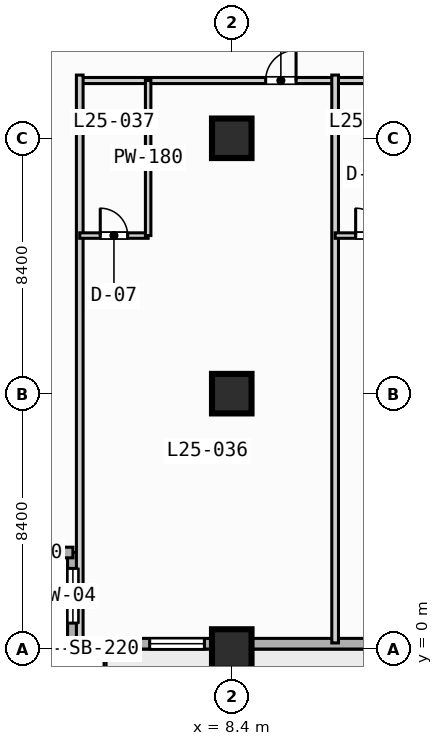
"""IFC4 building model, lengths in metres.
Left out: names, types, materials, properties, quantities, classifications, styles, units other than length and angle.
Written with IfcOpenShell. Run it as: python <this file> out.ifc"""

import sys

from ifc_helpers import new_model, si_unit, direction, frame, frame_2d, origin, origin_2d, place, context, subcontext, project, spatial, rectangle, extrude, element, fill, save


model = new_model("IFC4")
c1 = context("Model", 3, precision=1e-05, world=origin(), true_north=direction((0.0, 1.0)))
c2 = subcontext(c1, "Body", "Model", "MODEL_VIEW")
j1 = project(units=[si_unit("LENGTHUNIT", "METRE"), si_unit("PLANEANGLEUNIT", "RADIAN")], contexts=[c1])
p1 = place(None, origin())
s1 = spatial("IfcSite", under=j1, at=p1, CompositionType="ELEMENT")
p2 = place(p1, origin())
s2 = spatial("IfcBuilding", under=s1, at=p2, CompositionType="ELEMENT")
p3 = place(p2, frame((0.0, 0.0, 107.6)))
s3 = spatial("IfcBuildingStorey", under=s2, at=p3, CompositionType="ELEMENT", Elevation=107.6)
for number, where, z_axis, x_axis in (
    (1, (8.4, 0.0, 0.0), (0.0, 0.0, 1.0), (1.0, 0.0, 0.0)),
    (2, (8.4, 8.4, 0.0), (0.0, 0.0, 1.0), (1.0, 0.0, 0.0)),
    (3, (8.4, 16.8, 0.0), (0.0, 0.0, 1.0), (1.0, 0.0, 0.0)),
):
    element("IfcColumn", number, at=place(p3, frame(where, z_axis=z_axis, x_axis=x_axis)), inside=s3, PredefinedType="COLUMN", context=c2, shape_type="SweptSolid", body=[
        extrude(rectangle(XDim=1.3, YDim=1.3, at=origin_2d()), origin(), (0.0, 0.0, 1.0), 3.8),
    ])
p4 = place(p3, frame((3.175, 0.175, 0.0), z_axis=(0.0, 0.0, 1.0), x_axis=(0.0, 1.0, 0.0)))
e4 = element("IfcWall", 4, at=p4, inside=s3, PredefinedType="STANDARD", context=c2, shape_type="SweptSolid", body=[
    extrude(rectangle(XDim=3.0, YDim=0.35, at=frame_2d((1.5, 0.0))), origin(), (0.0, 0.0, 1.0), 3.55),
])
p5 = place(p4, frame((0.677, 0.0, 0.85)))
e5 = element("IfcOpeningElement", 5, at=p5, cuts=e4, PredefinedType="OPENING", context=c2, shape_type="SweptSolid", body=[
    extrude(rectangle(XDim=1.8, YDim=1.8, at=frame_2d((0.9, 0.9))), frame((0.0, 0.185, 0.0), z_axis=(0.0, -1.0, 0.0), x_axis=(1.0, 0.0, 0.0)), (0.0, 0.0, 1.0), 0.37),
])
p6 = place(p3, frame((3.175, 3.175, 0.0), z_axis=(0.0, 0.0, 1.0), x_axis=(-1.0, 0.0, 0.0)))
e6 = element("IfcWall", 6, at=p6, inside=s3, PredefinedType="STANDARD", context=c2, shape_type="SweptSolid", body=[
    extrude(rectangle(XDim=3.0, YDim=0.35, at=frame_2d((1.5, 0.0))), origin(), (0.0, 0.0, 1.0), 3.55),
])
p7 = place(p3, frame((72.425, 0.175, 0.0), z_axis=(0.0, 0.0, 1.0), x_axis=(-1.0, 0.0, 0.0)))
e7 = element("IfcWall", 7, at=p7, inside=s3, PredefinedType="STANDARD", context=c2, shape_type="SweptSolid", body=[
    extrude(rectangle(XDim=69.25, YDim=0.35, at=frame_2d((34.625, 0.0))), origin(), (0.0, 0.0, 1.0), 3.55),
])
p8 = place(p7, frame((50.225, 0.0, 0.0)))
e8 = element("IfcOpeningElement", 8, at=p8, cuts=e7, PredefinedType="OPENING", context=c2, shape_type="SweptSolid", body=[
    extrude(rectangle(XDim=1.4, YDim=2.2, at=frame_2d((0.7, 1.1))), frame((0.0, 0.185, 0.0), z_axis=(0.0, -1.0, 0.0), x_axis=(1.0, 0.0, 0.0)), (0.0, 0.0, 1.0), 0.37),
])
p9 = place(p7, frame((33.525, 0.0, 0.85)))
e9 = element("IfcOpeningElement", 9, at=p9, cuts=e7, PredefinedType="OPENING", context=c2, shape_type="SweptSolid", body=[
    extrude(rectangle(XDim=2.2, YDim=1.8, at=frame_2d((1.1, 0.9))), frame((0.0, 0.185, 0.0), z_axis=(0.0, -1.0, 0.0), x_axis=(1.0, 0.0, 0.0)), (0.0, 0.0, 1.0), 0.37),
])
p10 = place(p7, frame((25.125, 0.0, 0.85)))
e10 = element("IfcOpeningElement", 10, at=p10, cuts=e7, PredefinedType="OPENING", context=c2, shape_type="SweptSolid", body=[
    extrude(rectangle(XDim=2.2, YDim=1.8, at=frame_2d((1.1, 0.9))), frame((0.0, 0.185, 0.0), z_axis=(0.0, -1.0, 0.0), x_axis=(1.0, 0.0, 0.0)), (0.0, 0.0, 1.0), 0.37),
])
p11 = place(p7, frame((8.325, 0.0, 0.85)))
e11 = element("IfcOpeningElement", 11, at=p11, cuts=e7, PredefinedType="OPENING", context=c2, shape_type="SweptSolid", body=[
    extrude(rectangle(XDim=2.2, YDim=1.8, at=frame_2d((1.1, 0.9))), frame((0.0, 0.185, 0.0), z_axis=(0.0, -1.0, 0.0), x_axis=(1.0, 0.0, 0.0)), (0.0, 0.0, 1.0), 0.37),
])
p12 = place(p7, frame((64.925, 0.0, 0.85)))
e12 = element("IfcOpeningElement", 12, at=p12, cuts=e7, PredefinedType="OPENING", context=c2, shape_type="SweptSolid", body=[
    extrude(rectangle(XDim=1.8, YDim=1.8, at=frame_2d((0.9, 0.9))), frame((0.0, 0.185, 0.0), z_axis=(0.0, -1.0, 0.0), x_axis=(1.0, 0.0, 0.0)), (0.0, 0.0, 1.0), 0.37),
])
p13 = place(p7, frame((56.525, 0.0, 0.85)))
e13 = element("IfcOpeningElement", 13, at=p13, cuts=e7, PredefinedType="OPENING", context=c2, shape_type="SweptSolid", body=[
    extrude(rectangle(XDim=1.8, YDim=1.8, at=frame_2d((0.9, 0.9))), frame((0.0, 0.185, 0.0), z_axis=(0.0, -1.0, 0.0), x_axis=(1.0, 0.0, 0.0)), (0.0, 0.0, 1.0), 0.37),
])
p14 = place(p7, frame((2.125, 0.0, 0.85)))
e14 = element("IfcOpeningElement", 14, at=p14, cuts=e7, PredefinedType="OPENING", context=c2, shape_type="SweptSolid", body=[
    extrude(rectangle(XDim=1.8, YDim=1.8, at=frame_2d((0.9, 0.9))), frame((0.0, 0.185, 0.0), z_axis=(0.0, -1.0, 0.0), x_axis=(1.0, 0.0, 0.0)), (0.0, 0.0, 1.0), 0.37),
])
p15 = place(p3, frame((3.4, 18.7, 0.0), z_axis=(0.0, 0.0, 1.0), x_axis=(1.0, 0.0, 0.0)))
e15 = element("IfcWall", 15, at=p15, inside=s3, PredefinedType="PARTITIONING", context=c2, shape_type="SweptSolid", body=[
    extrude(rectangle(XDim=35.8, YDim=0.2, at=frame_2d((17.9, 0.0))), origin(), (0.0, 0.0, 1.0), 3.55),
])
p16 = place(p15, frame((6.115, 0.0, 0.0)))
e16 = element("IfcOpeningElement", 16, at=p16, cuts=e15, PredefinedType="OPENING", context=c2, shape_type="SweptSolid", body=[
    extrude(rectangle(XDim=1.0, YDim=2.15, at=frame_2d((0.5, 1.075))), frame((0.0, 0.11, 0.0), z_axis=(0.0, -1.0, 0.0), x_axis=(1.0, 0.0, 0.0)), (0.0, 0.0, 1.0), 0.22),
])
p17 = place(p15, frame((14.515, 0.0, 0.0)))
e17 = element("IfcOpeningElement", 17, at=p17, cuts=e15, PredefinedType="OPENING", context=c2, shape_type="SweptSolid", body=[
    extrude(rectangle(XDim=1.0, YDim=2.15, at=frame_2d((0.5, 1.075))), frame((0.0, 0.11, 0.0), z_axis=(0.0, -1.0, 0.0), x_axis=(1.0, 0.0, 0.0)), (0.0, 0.0, 1.0), 0.22),
])
p18 = place(p15, frame((22.915, 0.0, 0.0)))
e18 = element("IfcOpeningElement", 18, at=p18, cuts=e15, PredefinedType="OPENING", context=c2, shape_type="SweptSolid", body=[
    extrude(rectangle(XDim=1.0, YDim=2.15, at=frame_2d((0.5, 1.075))), frame((0.0, 0.11, 0.0), z_axis=(0.0, -1.0, 0.0), x_axis=(1.0, 0.0, 0.0)), (0.0, 0.0, 1.0), 0.22),
])
p19 = place(p15, frame((31.165, 0.0, 0.0)))
e19 = element("IfcOpeningElement", 19, at=p19, cuts=e15, PredefinedType="OPENING", context=c2, shape_type="SweptSolid", body=[
    extrude(rectangle(XDim=1.0, YDim=2.15, at=frame_2d((0.5, 1.075))), frame((0.0, 0.11, 0.0), z_axis=(0.0, -1.0, 0.0), x_axis=(1.0, 0.0, 0.0)), (0.0, 0.0, 1.0), 0.22),
])
p20 = place(p3, frame((3.4, 0.2, 0.0), z_axis=(0.0, 0.0, 1.0), x_axis=(0.0, 1.0, 0.0)))
e20 = element("IfcWall", 20, at=p20, inside=s3, PredefinedType="PARTITIONING", context=c2, shape_type="SweptSolid", body=[
    extrude(rectangle(XDim=18.68, YDim=0.22, at=frame_2d((9.34, 0.0))), origin(), (0.0, 0.0, 1.0), 3.55),
])
p21 = place(p3, frame((3.4, 13.6, 0.0), z_axis=(0.0, 0.0, 1.0), x_axis=(1.0, 0.0, 0.0)))
e21 = element("IfcWall", 21, at=p21, inside=s3, PredefinedType="PLUMBINGWALL", context=c2, shape_type="SweptSolid", body=[
    extrude(rectangle(XDim=2.25, YDim=0.18, at=frame_2d((1.125, 0.0))), origin(), (0.0, 0.0, 1.0), 3.55),
])
p22 = place(p21, frame((0.675, 0.0, 0.0)))
e22 = element("IfcOpeningElement", 22, at=p22, cuts=e21, PredefinedType="OPENING", context=c2, shape_type="SweptSolid", body=[
    extrude(rectangle(XDim=0.9, YDim=2.1, at=frame_2d((0.45, 1.05))), frame((0.0, 0.1, 0.0), z_axis=(0.0, -1.0, 0.0), x_axis=(1.0, 0.0, 0.0)), (0.0, 0.0, 1.0), 0.2),
])
p23 = place(p3, frame((5.65, 13.6, 0.0), z_axis=(0.0, 0.0, 1.0), x_axis=(0.0, 1.0, 0.0)))
e23 = element("IfcWall", 23, at=p23, inside=s3, PredefinedType="PLUMBINGWALL", context=c2, shape_type="SweptSolid", body=[
    extrude(rectangle(XDim=5.1, YDim=0.18, at=frame_2d((2.55, 0.0))), origin(), (0.0, 0.0, 1.0), 3.55),
])
p24 = place(p3, frame((11.8, 0.2, 0.0), z_axis=(0.0, 0.0, 1.0), x_axis=(0.0, 1.0, 0.0)))
e24 = element("IfcWall", 24, at=p24, inside=s3, PredefinedType="PARTITIONING", context=c2, shape_type="SweptSolid", body=[
    extrude(rectangle(XDim=18.68, YDim=0.22, at=frame_2d((9.34, 0.0))), origin(), (0.0, 0.0, 1.0), 3.55),
])
p25 = place(p3, frame((11.8, 13.6, 0.0), z_axis=(0.0, 0.0, 1.0), x_axis=(1.0, 0.0, 0.0)))
e25 = element("IfcWall", 25, at=p25, inside=s3, PredefinedType="PLUMBINGWALL", context=c2, shape_type="SweptSolid", body=[
    extrude(rectangle(XDim=2.25, YDim=0.18, at=frame_2d((1.125, 0.0))), origin(), (0.0, 0.0, 1.0), 3.55),
])
p26 = place(p25, frame((0.675, 0.0, 0.0)))
e26 = element("IfcOpeningElement", 26, at=p26, cuts=e25, PredefinedType="OPENING", context=c2, shape_type="SweptSolid", body=[
    extrude(rectangle(XDim=0.9, YDim=2.1, at=frame_2d((0.45, 1.05))), frame((0.0, 0.1, 0.0), z_axis=(0.0, -1.0, 0.0), x_axis=(1.0, 0.0, 0.0)), (0.0, 0.0, 1.0), 0.2),
])
p27 = place(p5, origin())
e27 = element("IfcWindow", 27, at=p27, inside=s3, PartitioningType="SINGLE_PANEL", PredefinedType="WINDOW", context=c2, shape_type="SweptSolid", body=[
    extrude(rectangle(XDim=1.8, YDim=1.8, at=frame_2d((0.9, 0.9))), frame((0.0, 0.03, 0.0), z_axis=(0.0, -1.0, 0.0), x_axis=(1.0, 0.0, 0.0)), (0.0, 0.0, 1.0), 0.06),
])
fill(e5, e27)
p28 = place(p12, origin())
e28 = element("IfcWindow", 28, at=p28, inside=s3, PartitioningType="SINGLE_PANEL", PredefinedType="WINDOW", context=c2, shape_type="SweptSolid", body=[
    extrude(rectangle(XDim=1.8, YDim=1.8, at=frame_2d((0.9, 0.9))), frame((0.0, 0.03, 0.0), z_axis=(0.0, -1.0, 0.0), x_axis=(1.0, 0.0, 0.0)), (0.0, 0.0, 1.0), 0.06),
])
fill(e12, e28)
p29 = place(p16, origin())
e29 = element("IfcDoor", 29, at=p29, inside=s3, OperationType="SINGLE_SWING_RIGHT", PredefinedType="DOOR", context=c2, shape_type="SweptSolid", body=[
    extrude(rectangle(XDim=1.0, YDim=2.15, at=frame_2d((0.5, 1.075))), frame((0.0, 0.025, 0.0), z_axis=(0.0, -1.0, 0.0), x_axis=(1.0, 0.0, 0.0)), (0.0, 0.0, 1.0), 0.05),
])
fill(e16, e29)
p30 = place(p22, origin())
e30 = element("IfcDoor", 30, at=p30, inside=s3, OperationType="SINGLE_SWING_LEFT", PredefinedType="DOOR", context=c2, shape_type="SweptSolid", body=[
    extrude(rectangle(XDim=0.9, YDim=2.1, at=frame_2d((0.45, 1.05))), frame((0.0, 0.025, 0.0), z_axis=(0.0, -1.0, 0.0), x_axis=(1.0, 0.0, 0.0)), (0.0, 0.0, 1.0), 0.05),
])
fill(e22, e30)
p31 = place(p26, origin())
e31 = element("IfcDoor", 31, at=p31, inside=s3, OperationType="SINGLE_SWING_LEFT", PredefinedType="DOOR", context=c2, shape_type="SweptSolid", body=[
    extrude(rectangle(XDim=0.9, YDim=2.1, at=frame_2d((0.45, 1.05))), frame((0.0, 0.025, 0.0), z_axis=(0.0, -1.0, 0.0), x_axis=(1.0, 0.0, 0.0)), (0.0, 0.0, 1.0), 0.05),
])
fill(e26, e31)
save(model, sys.argv[1])
